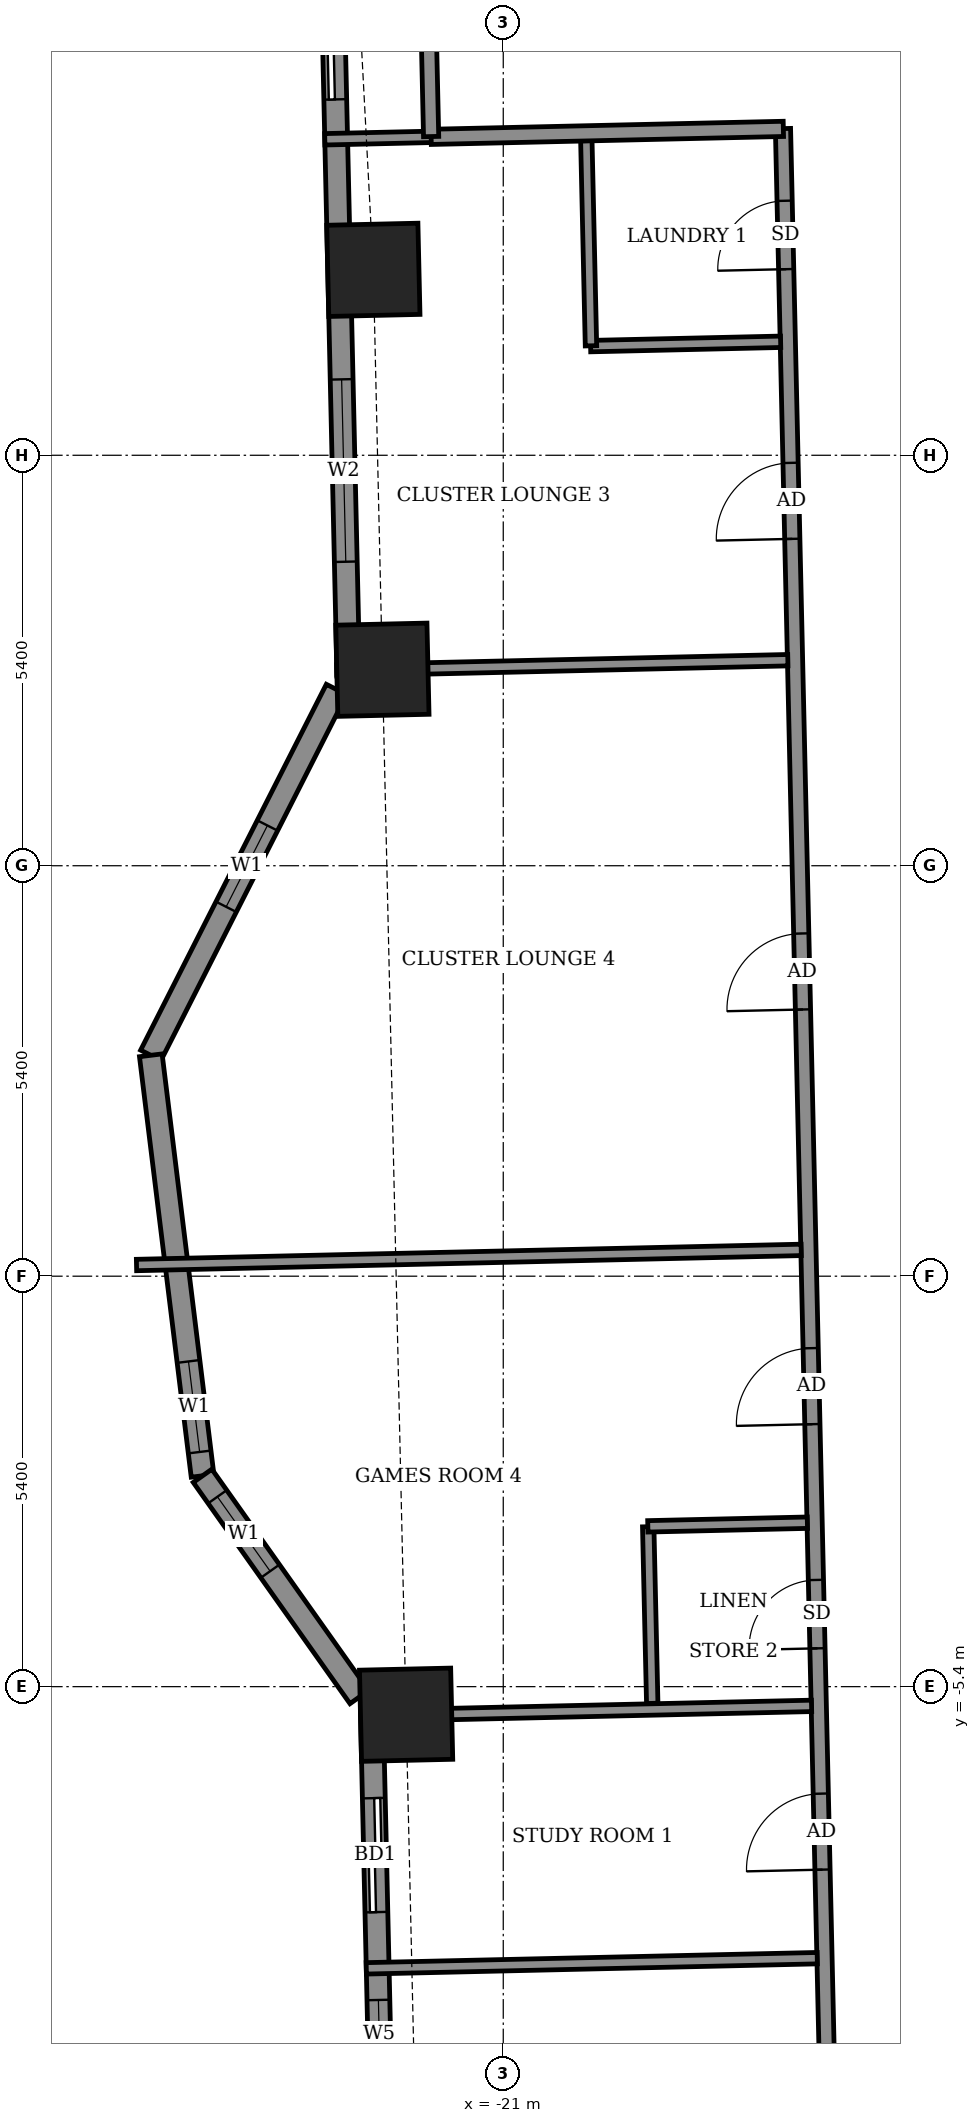
"""IFC4 building model, lengths in metres.
Left out: names, types, materials, properties, quantities, classifications, styles, units other than length and angle.
Written with IfcOpenShell. Run it as: python <this file> out.ifc"""

import sys

from ifc_helpers import new_model, si_unit, direction, frame, frame_2d, origin, origin_2d, place, context, subcontext, project, spatial, rectangle, extrude, element, fill, save


model = new_model("IFC4")
c1 = context("Model", 3, precision=1e-05, world=origin(), true_north=direction((0.0, 1.0)))
c2 = subcontext(c1, "Body", "Model", "MODEL_VIEW")
j1 = project(units=[si_unit("LENGTHUNIT", "METRE"), si_unit("PLANEANGLEUNIT", "RADIAN")], contexts=[c1])
p1 = place(None, origin())
s1 = spatial("IfcSite", under=j1, at=p1, CompositionType="ELEMENT")
p2 = place(p1, origin())
s2 = spatial("IfcBuilding", under=s1, at=p2, CompositionType="ELEMENT")
p3 = place(p2, frame((0.0, 0.0, 175.3)))
s3 = spatial("IfcBuildingStorey", under=s2, at=p3, CompositionType="ELEMENT", Elevation=175.3)
for number, where, z_axis, x_axis in (
    (1, (-22.278, -5.769, -0.55), (0.0, 0.0, 1.0), (0.023, -1.0, 0.0)),
    (2, (-22.709, 13.24, -0.55), (0.0, 0.0, 1.0), (0.023, -1.0, 0.0)),
    (3, (-22.59, 7.979, -0.55), (0.0, 0.0, 1.0), (0.023, -1.0, 0.0)),
):
    element("IfcColumn", number, at=place(p3, frame(where, z_axis=z_axis, x_axis=x_axis)), inside=s3, PredefinedType="COLUMN", context=c2, shape_type="SweptSolid", body=[
        extrude(rectangle(XDim=1.2, YDim=1.2, at=origin_2d()), origin(), (0.0, 0.0, 1.0), 3.6),
    ])
p4 = place(p3, frame((-23.275, 18.34, 0.0), z_axis=(0.0, 0.0, 1.0), x_axis=(0.022705985163, -0.999742185885, 0.0)))
e4 = element("IfcWall", 4, at=p4, inside=s3, PredefinedType="SOLIDWALL", context=c2, shape_type="SweptSolid", body=[
    extrude(rectangle(XDim=10.43, YDim=0.3, at=frame_2d((5.215, 0.0))), origin(), (0.0, 0.0, 1.0), 3.05),
])
p5 = place(p4, frame((1.359, 0.0, 0.0)))
e5 = element("IfcOpeningElement", 5, at=p5, cuts=e4, PredefinedType="OPENING", context=c2, shape_type="SweptSolid", body=[
    extrude(rectangle(XDim=1.5, YDim=2.4, at=frame_2d((0.75, 1.2))), frame((0.0, 0.16, 0.0), z_axis=(0.0, -1.0, 0.0), x_axis=(1.0, 0.0, 0.0)), (0.0, 0.0, 1.0), 0.32),
])
p6 = place(p4, frame((6.543, 0.0, 0.9)))
e6 = element("IfcOpeningElement", 6, at=p6, cuts=e4, PredefinedType="OPENING", context=c2, shape_type="SweptSolid", body=[
    extrude(rectangle(XDim=2.4, YDim=1.5, at=frame_2d((1.2, 0.75))), frame((0.0, 0.16, 0.0), z_axis=(0.0, -1.0, 0.0), x_axis=(1.0, 0.0, 0.0)), (0.0, 0.0, 1.0), 0.32),
])
p7 = place(p3, frame((-23.194, 7.719, 0.0), z_axis=(0.0, 0.0, 1.0), x_axis=(-0.452597193435, -0.891715078091, 0.0)))
e7 = element("IfcWall", 7, at=p7, inside=s3, PredefinedType="SOLIDWALL", context=c2, shape_type="SweptSolid", body=[
    extrude(rectangle(XDim=5.397, YDim=0.3, at=frame_2d((2.699, 0.0))), origin(), (0.0, 0.0, 1.0), 3.05),
])
p8 = place(p7, frame((2.007, 0.0, 0.9)))
e8 = element("IfcOpeningElement", 8, at=p8, cuts=e7, PredefinedType="OPENING", context=c2, shape_type="SweptSolid", body=[
    extrude(rectangle(XDim=1.2, YDim=1.5, at=frame_2d((0.6, 0.75))), frame((0.0, 0.16, 0.0), z_axis=(0.0, -1.0, 0.0), x_axis=(1.0, 0.0, 0.0)), (0.0, 0.0, 1.0), 0.32),
])
p9 = place(p3, frame((-25.637, 2.906, 0.0), z_axis=(0.0, 0.0, 1.0), x_axis=(0.122163831021, -0.992509948761, 0.0)))
e9 = element("IfcWall", 9, at=p9, inside=s3, PredefinedType="SOLIDWALL", context=c2, shape_type="SweptSolid", body=[
    extrude(rectangle(XDim=5.574, YDim=0.3, at=frame_2d((2.787, 0.0))), origin(), (0.0, 0.0, 1.0), 3.05),
])
p10 = place(p9, frame((4.058, 0.0, 0.9)))
e10 = element("IfcOpeningElement", 10, at=p10, cuts=e9, PredefinedType="OPENING", context=c2, shape_type="SweptSolid", body=[
    extrude(rectangle(XDim=1.2, YDim=1.5, at=frame_2d((0.6, 0.75))), frame((0.0, 0.16, 0.0), z_axis=(0.0, -1.0, 0.0), x_axis=(1.0, 0.0, 0.0)), (0.0, 0.0, 1.0), 0.32),
])
p11 = place(p3, frame((-24.956, -2.626, 0.0), z_axis=(0.0, 0.0, 1.0), x_axis=(0.578009745555, -0.816029861, 0.0)))
e11 = element("IfcWall", 11, at=p11, inside=s3, PredefinedType="SOLIDWALL", context=c2, shape_type="SweptSolid", body=[
    extrude(rectangle(XDim=3.567, YDim=0.3, at=frame_2d((1.784, 0.0))), origin(), (0.0, 0.0, 1.0), 3.05),
])
p12 = place(p11, frame((0.338, 0.0, 0.9)))
e12 = element("IfcOpeningElement", 12, at=p12, cuts=e11, PredefinedType="OPENING", context=c2, shape_type="SweptSolid", body=[
    extrude(rectangle(XDim=1.2, YDim=1.5, at=frame_2d((0.6, 0.75))), frame((0.0, 0.16, 0.0), z_axis=(0.0, -1.0, 0.0), x_axis=(1.0, 0.0, 0.0)), (0.0, 0.0, 1.0), 0.32),
])
p13 = place(p3, frame((-22.729, -5.725, 0.0), z_axis=(0.0, 0.0, 1.0), x_axis=(0.022726014582, -0.999741730779, 0.0)))
e13 = element("IfcWall", 13, at=p13, inside=s3, PredefinedType="SOLIDWALL", context=c2, shape_type="SweptSolid", body=[
    extrude(rectangle(XDim=10.829, YDim=0.3, at=frame_2d((5.414, 0.0))), origin(), (0.0, 0.0, 1.0), 3.05),
])
p14 = place(p13, frame((1.142, 0.0, 0.0)))
e14 = element("IfcOpeningElement", 14, at=p14, cuts=e13, PredefinedType="OPENING", context=c2, shape_type="SweptSolid", body=[
    extrude(rectangle(XDim=1.5, YDim=2.4, at=frame_2d((0.75, 1.2))), frame((0.0, 0.16, 0.0), z_axis=(0.0, -1.0, 0.0), x_axis=(1.0, 0.0, 0.0)), (0.0, 0.0, 1.0), 0.32),
])
p15 = place(p13, frame((3.798, 0.0, 0.9)))
e15 = element("IfcOpeningElement", 15, at=p15, cuts=e13, PredefinedType="OPENING", context=c2, shape_type="SweptSolid", body=[
    extrude(rectangle(XDim=0.9, YDim=1.5, at=frame_2d((0.45, 0.75))), frame((0.0, 0.16, 0.0), z_axis=(0.0, -1.0, 0.0), x_axis=(1.0, 0.0, 0.0)), (0.0, 0.0, 1.0), 0.32),
])
p16 = place(p13, frame((8.05, 0.0, 0.9)))
e16 = element("IfcOpeningElement", 16, at=p16, cuts=e13, PredefinedType="OPENING", context=c2, shape_type="SweptSolid", body=[
    extrude(rectangle(XDim=1.2, YDim=1.5, at=frame_2d((0.6, 0.75))), frame((0.0, 0.16, 0.0), z_axis=(0.0, -1.0, 0.0), x_axis=(1.0, 0.0, 0.0)), (0.0, 0.0, 1.0), 0.32),
])
p17 = place(p3, frame((-25.988, 16.028, 0.0), z_axis=(0.0, 0.0, 1.0), x_axis=(-0.022892431828, 0.999737933943, 0.0)))
e17 = element("IfcWall", 17, at=p17, inside=s3, PredefinedType="USERDEFINED", context=c2, shape_type="SweptSolid", body=[
    extrude(rectangle(XDim=2.4, YDim=0.55, at=frame_2d((1.2, 0.0))), origin(), (0.0, 0.0, 1.0), 0.8),
])
p18 = place(p3, frame((-16.684, -12.919, 0.0), z_axis=(0.0, 0.0, 1.0), x_axis=(-0.022694293906, 0.999742451346, 0.0)))
e18 = element("IfcWall", 18, at=p18, inside=s3, PredefinedType="PARTITIONING", context=c2, shape_type="SweptSolid", body=[
    extrude(rectangle(XDim=28.024, YDim=0.2, at=frame_2d((14.012, 0.0))), origin(), (0.0, 0.0, 1.0), 3.05),
])
p19 = place(p18, frame((22.625, 0.0, 0.0)))
e19 = element("IfcOpeningElement", 19, at=p19, cuts=e18, PredefinedType="OPENING", context=c2, shape_type="SweptSolid", body=[
    extrude(rectangle(XDim=1.0, YDim=2.1, at=frame_2d((0.5, 1.05))), frame((0.0, 0.11, 0.0), z_axis=(0.0, -1.0, 0.0), x_axis=(1.0, 0.0, 0.0)), (0.0, 0.0, 1.0), 0.22),
])
p20 = place(p18, frame((26.174, 0.0, 0.0)))
e20 = element("IfcOpeningElement", 20, at=p20, cuts=e18, PredefinedType="OPENING", context=c2, shape_type="SweptSolid", body=[
    extrude(rectangle(XDim=0.9, YDim=2.1, at=frame_2d((0.45, 1.05))), frame((0.0, 0.11, 0.0), z_axis=(0.0, -1.0, 0.0), x_axis=(1.0, 0.0, 0.0)), (0.0, 0.0, 1.0), 0.22),
])
p21 = place(p18, frame((16.432, 0.0, 0.0)))
e21 = element("IfcOpeningElement", 21, at=p21, cuts=e18, PredefinedType="OPENING", context=c2, shape_type="SweptSolid", body=[
    extrude(rectangle(XDim=1.0, YDim=2.1, at=frame_2d((0.5, 1.05))), frame((0.0, 0.11, 0.0), z_axis=(0.0, -1.0, 0.0), x_axis=(1.0, 0.0, 0.0)), (0.0, 0.0, 1.0), 0.22),
])
p22 = place(p18, frame((10.975, 0.0, 0.0)))
e22 = element("IfcOpeningElement", 22, at=p22, cuts=e18, PredefinedType="OPENING", context=c2, shape_type="SweptSolid", body=[
    extrude(rectangle(XDim=1.0, YDim=2.1, at=frame_2d((0.5, 1.05))), frame((0.0, 0.11, 0.0), z_axis=(0.0, -1.0, 0.0), x_axis=(1.0, 0.0, 0.0)), (0.0, 0.0, 1.0), 0.22),
])
p23 = place(p18, frame((8.025, 0.0, 0.0)))
e23 = element("IfcOpeningElement", 23, at=p23, cuts=e18, PredefinedType="OPENING", context=c2, shape_type="SweptSolid", body=[
    extrude(rectangle(XDim=0.9, YDim=2.1, at=frame_2d((0.45, 1.05))), frame((0.0, 0.11, 0.0), z_axis=(0.0, -1.0, 0.0), x_axis=(1.0, 0.0, 0.0)), (0.0, 0.0, 1.0), 0.22),
])
p24 = place(p18, frame((5.113, 0.0, 0.0)))
e24 = element("IfcOpeningElement", 24, at=p24, cuts=e18, PredefinedType="OPENING", context=c2, shape_type="SweptSolid", body=[
    extrude(rectangle(XDim=1.0, YDim=2.1, at=frame_2d((0.5, 1.05))), frame((0.0, 0.11, 0.0), z_axis=(0.0, -1.0, 0.0), x_axis=(1.0, 0.0, 0.0)), (0.0, 0.0, 1.0), 0.22),
])
p25 = place(p3, frame((-22.802, -9.106, 0.0), z_axis=(0.0, 0.0, 1.0), x_axis=(0.999744927012, 0.022584970987, 0.0)))
e25 = element("IfcWall", 25, at=p25, inside=s3, PredefinedType="PARTITIONING", context=c2, shape_type="SweptSolid", body=[
    extrude(rectangle(XDim=5.935, YDim=0.15, at=frame_2d((2.967, 0.0))), origin(), (0.0, 0.0, 1.0), 2.55),
])
p26 = place(p3, frame((-22.578, -5.78, 0.0), z_axis=(0.0, 0.0, 1.0), x_axis=(0.999746200787, 0.022528515532, 0.0)))
e26 = element("IfcWall", 26, at=p26, inside=s3, PredefinedType="PARTITIONING", context=c2, shape_type="SweptSolid", body=[
    extrude(rectangle(XDim=5.635, YDim=0.15, at=frame_2d((2.818, 0.0))), origin(), (0.0, 0.0, 1.0), 3.05),
])
p27 = place(p3, frame((-19.04, -5.62, 0.0), z_axis=(0.0, 0.0, 1.0), x_axis=(-0.022788198363, 0.99974031529, 0.0)))
e27 = element("IfcWall", 27, at=p27, inside=s3, PredefinedType="PARTITIONING", context=c2, shape_type="SweptSolid", body=[
    extrude(rectangle(XDim=2.325, YDim=0.15, at=frame_2d((1.162, 0.0))), origin(), (0.0, 0.0, 1.0), 3.05),
])
p28 = place(p3, frame((-19.098, -3.291, 0.0), z_axis=(0.0, 0.0, 1.0), x_axis=(0.999737555419, 0.022908956429, 0.0)))
e28 = element("IfcWall", 28, at=p28, inside=s3, PredefinedType="PARTITIONING", context=c2, shape_type="SweptSolid", body=[
    extrude(rectangle(XDim=2.099, YDim=0.15, at=frame_2d((1.05, 0.0))), origin(), (0.0, 0.0, 1.0), 3.05),
])
p29 = place(p3, frame((-25.825, 0.147, 0.0), z_axis=(0.0, 0.0, 1.0), x_axis=(0.999741244423, 0.022747399821, 0.0)))
e29 = element("IfcWall", 29, at=p29, inside=s3, PredefinedType="PARTITIONING", context=c2, shape_type="SweptSolid", body=[
    extrude(rectangle(XDim=8.747, YDim=0.15, at=frame_2d((4.374, 0.0))), origin(), (0.0, 0.0, 1.0), 2.1),
])
p30 = place(p3, frame((-23.19, 7.969, 0.0), z_axis=(0.0, 0.0, 1.0), x_axis=(0.999741261868, 0.022746633113, 0.0)))
e30 = element("IfcWall", 30, at=p30, inside=s3, PredefinedType="PARTITIONING", context=c2, shape_type="SweptSolid", body=[
    extrude(rectangle(XDim=5.935, YDim=0.15, at=frame_2d((2.968, 0.0))), origin(), (0.0, 0.0, 1.0), 3.05),
])
p31 = place(p3, frame((-19.851, 12.236, 0.0), z_axis=(0.0, 0.0, 1.0), x_axis=(0.999741230352, 0.02274801823, 0.0)))
e31 = element("IfcWall", 31, at=p31, inside=s3, PredefinedType="PARTITIONING", context=c2, shape_type="SweptSolid", body=[
    extrude(rectangle(XDim=2.501, YDim=0.15, at=frame_2d((1.25, 0.0))), origin(), (0.0, 0.0, 1.0), 3.05),
])
p32 = place(p3, frame((-19.846, 12.24, 0.0), z_axis=(0.0, 0.0, 1.0), x_axis=(-0.02260842146, 0.999744396973, 0.0)))
e32 = element("IfcWall", 32, at=p32, inside=s3, PredefinedType="PARTITIONING", context=c2, shape_type="SweptSolid", body=[
    extrude(rectangle(XDim=2.7, YDim=0.15, at=frame_2d((1.35, 0.0))), origin(), (0.0, 0.0, 1.0), 3.05),
])
p33 = place(p3, frame((-23.348, 14.957, 0.0), z_axis=(0.0, 0.0, 1.0), x_axis=(0.999740216184, 0.022792545827, 0.0)))
e33 = element("IfcWall", 33, at=p33, inside=s3, PredefinedType="PARTITIONING", context=c2, shape_type="SweptSolid", body=[
    extrude(rectangle(XDim=1.403, YDim=0.15, at=frame_2d((0.702, 0.0))), origin(), (0.0, 0.0, 1.0), 2.55),
])
p34 = place(p3, frame((-21.949, 14.989, 0.0), z_axis=(0.0, 0.0, 1.0), x_axis=(0.999743491588, 0.022648422179, 0.0)))
e34 = element("IfcWall", 34, at=p34, inside=s3, PredefinedType="PARTITIONING", context=c2, shape_type="SweptSolid", body=[
    extrude(rectangle(XDim=4.635, YDim=0.2, at=frame_2d((2.318, 0.0))), origin(), (0.0, 0.0, 1.0), 3.05),
])
p35 = place(p3, frame((-21.949, 14.993, 0.0), z_axis=(0.0, 0.0, 1.0), x_axis=(-0.022617910375, 0.999744182344, 0.0)))
e35 = element("IfcWall", 35, at=p35, inside=s3, PredefinedType="PARTITIONING", context=c2, shape_type="SweptSolid", body=[
    extrude(rectangle(XDim=1.5, YDim=0.2, at=frame_2d((0.75, 0.0))), origin(), (0.0, 0.0, 1.0), 3.05),
])
p36 = place(p5, origin())
e36 = element("IfcDoor", 36, at=p36, inside=s3, OperationType="SLIDING_TO_LEFT", PredefinedType="DOOR", context=c2, shape_type="SweptSolid", body=[
    extrude(rectangle(XDim=1.5, YDim=2.4, at=frame_2d((0.75, 1.2))), frame((0.0, 0.025, 0.0), z_axis=(0.0, -1.0, 0.0), x_axis=(1.0, 0.0, 0.0)), (0.0, 0.0, 1.0), 0.05),
])
fill(e5, e36)
p37 = place(p6, origin())
e37 = element("IfcWindow", 37, at=p37, inside=s3, PartitioningType="DOUBLE_PANEL_VERTICAL", PredefinedType="WINDOW", context=c2, shape_type="SweptSolid", body=[
    extrude(rectangle(XDim=2.4, YDim=1.5, at=frame_2d((1.2, 0.75))), frame((0.0, 0.03, 0.0), z_axis=(0.0, -1.0, 0.0), x_axis=(1.0, 0.0, 0.0)), (0.0, 0.0, 1.0), 0.06),
])
fill(e6, e37)
p38 = place(p8, origin())
e38 = element("IfcWindow", 38, at=p38, inside=s3, PartitioningType="SINGLE_PANEL", PredefinedType="WINDOW", context=c2, shape_type="SweptSolid", body=[
    extrude(rectangle(XDim=1.2, YDim=1.5, at=frame_2d((0.6, 0.75))), frame((0.0, 0.03, 0.0), z_axis=(0.0, -1.0, 0.0), x_axis=(1.0, 0.0, 0.0)), (0.0, 0.0, 1.0), 0.06),
])
fill(e8, e38)
p39 = place(p10, origin())
e39 = element("IfcWindow", 39, at=p39, inside=s3, PartitioningType="SINGLE_PANEL", PredefinedType="WINDOW", context=c2, shape_type="SweptSolid", body=[
    extrude(rectangle(XDim=1.2, YDim=1.5, at=frame_2d((0.6, 0.75))), frame((0.0, 0.03, 0.0), z_axis=(0.0, -1.0, 0.0), x_axis=(1.0, 0.0, 0.0)), (0.0, 0.0, 1.0), 0.06),
])
fill(e10, e39)
p40 = place(p12, origin())
e40 = element("IfcWindow", 40, at=p40, inside=s3, PartitioningType="SINGLE_PANEL", PredefinedType="WINDOW", context=c2, shape_type="SweptSolid", body=[
    extrude(rectangle(XDim=1.2, YDim=1.5, at=frame_2d((0.6, 0.75))), frame((0.0, 0.03, 0.0), z_axis=(0.0, -1.0, 0.0), x_axis=(1.0, 0.0, 0.0)), (0.0, 0.0, 1.0), 0.06),
])
fill(e12, e40)
p41 = place(p14, origin())
e41 = element("IfcDoor", 41, at=p41, inside=s3, OperationType="SLIDING_TO_LEFT", PredefinedType="DOOR", context=c2, shape_type="SweptSolid", body=[
    extrude(rectangle(XDim=1.5, YDim=2.4, at=frame_2d((0.75, 1.2))), frame((0.0, 0.025, 0.0), z_axis=(0.0, -1.0, 0.0), x_axis=(1.0, 0.0, 0.0)), (0.0, 0.0, 1.0), 0.05),
])
fill(e14, e41)
p42 = place(p15, origin())
e42 = element("IfcWindow", 42, at=p42, inside=s3, PartitioningType="SINGLE_PANEL", PredefinedType="WINDOW", context=c2, shape_type="SweptSolid", body=[
    extrude(rectangle(XDim=0.9, YDim=1.5, at=frame_2d((0.45, 0.75))), frame((0.0, 0.03, 0.0), z_axis=(0.0, -1.0, 0.0), x_axis=(1.0, 0.0, 0.0)), (0.0, 0.0, 1.0), 0.06),
])
fill(e15, e42)
p43 = place(p19, origin())
e43 = element("IfcDoor", 43, at=p43, inside=s3, OperationType="SINGLE_SWING_LEFT", PredefinedType="DOOR", context=c2, shape_type="SweptSolid", body=[
    extrude(rectangle(XDim=1.0, YDim=2.1, at=frame_2d((0.5, 1.05))), frame((0.0, 0.025, 0.0), z_axis=(0.0, -1.0, 0.0), x_axis=(1.0, 0.0, 0.0)), (0.0, 0.0, 1.0), 0.05),
])
fill(e19, e43)
p44 = place(p20, origin())
e44 = element("IfcDoor", 44, at=p44, inside=s3, OperationType="SINGLE_SWING_LEFT", PredefinedType="DOOR", context=c2, shape_type="SweptSolid", body=[
    extrude(rectangle(XDim=0.9, YDim=2.1, at=frame_2d((0.45, 1.05))), frame((0.0, 0.025, 0.0), z_axis=(0.0, -1.0, 0.0), x_axis=(1.0, 0.0, 0.0)), (0.0, 0.0, 1.0), 0.05),
])
fill(e20, e44)
p45 = place(p21, origin())
e45 = element("IfcDoor", 45, at=p45, inside=s3, OperationType="SINGLE_SWING_RIGHT", PredefinedType="DOOR", context=c2, shape_type="SweptSolid", body=[
    extrude(rectangle(XDim=1.0, YDim=2.1, at=frame_2d((0.5, 1.05))), frame((0.0, 0.025, 0.0), z_axis=(0.0, -1.0, 0.0), x_axis=(1.0, 0.0, 0.0)), (0.0, 0.0, 1.0), 0.05),
])
fill(e21, e45)
p46 = place(p22, origin())
e46 = element("IfcDoor", 46, at=p46, inside=s3, OperationType="SINGLE_SWING_LEFT", PredefinedType="DOOR", context=c2, shape_type="SweptSolid", body=[
    extrude(rectangle(XDim=1.0, YDim=2.1, at=frame_2d((0.5, 1.05))), frame((0.0, 0.025, 0.0), z_axis=(0.0, -1.0, 0.0), x_axis=(1.0, 0.0, 0.0)), (0.0, 0.0, 1.0), 0.05),
])
fill(e22, e46)
p47 = place(p23, origin())
e47 = element("IfcDoor", 47, at=p47, inside=s3, OperationType="SINGLE_SWING_RIGHT", PredefinedType="DOOR", context=c2, shape_type="SweptSolid", body=[
    extrude(rectangle(XDim=0.9, YDim=2.1, at=frame_2d((0.45, 1.05))), frame((0.0, 0.025, 0.0), z_axis=(0.0, -1.0, 0.0), x_axis=(1.0, 0.0, 0.0)), (0.0, 0.0, 1.0), 0.05),
])
fill(e23, e47)
p48 = place(p24, origin())
e48 = element("IfcDoor", 48, at=p48, inside=s3, OperationType="SINGLE_SWING_RIGHT", PredefinedType="DOOR", context=c2, shape_type="SweptSolid", body=[
    extrude(rectangle(XDim=1.0, YDim=2.1, at=frame_2d((0.5, 1.05))), frame((0.0, 0.025, 0.0), z_axis=(0.0, -1.0, 0.0), x_axis=(1.0, 0.0, 0.0)), (0.0, 0.0, 1.0), 0.05),
])
fill(e24, e48)
save(model, sys.argv[1])
